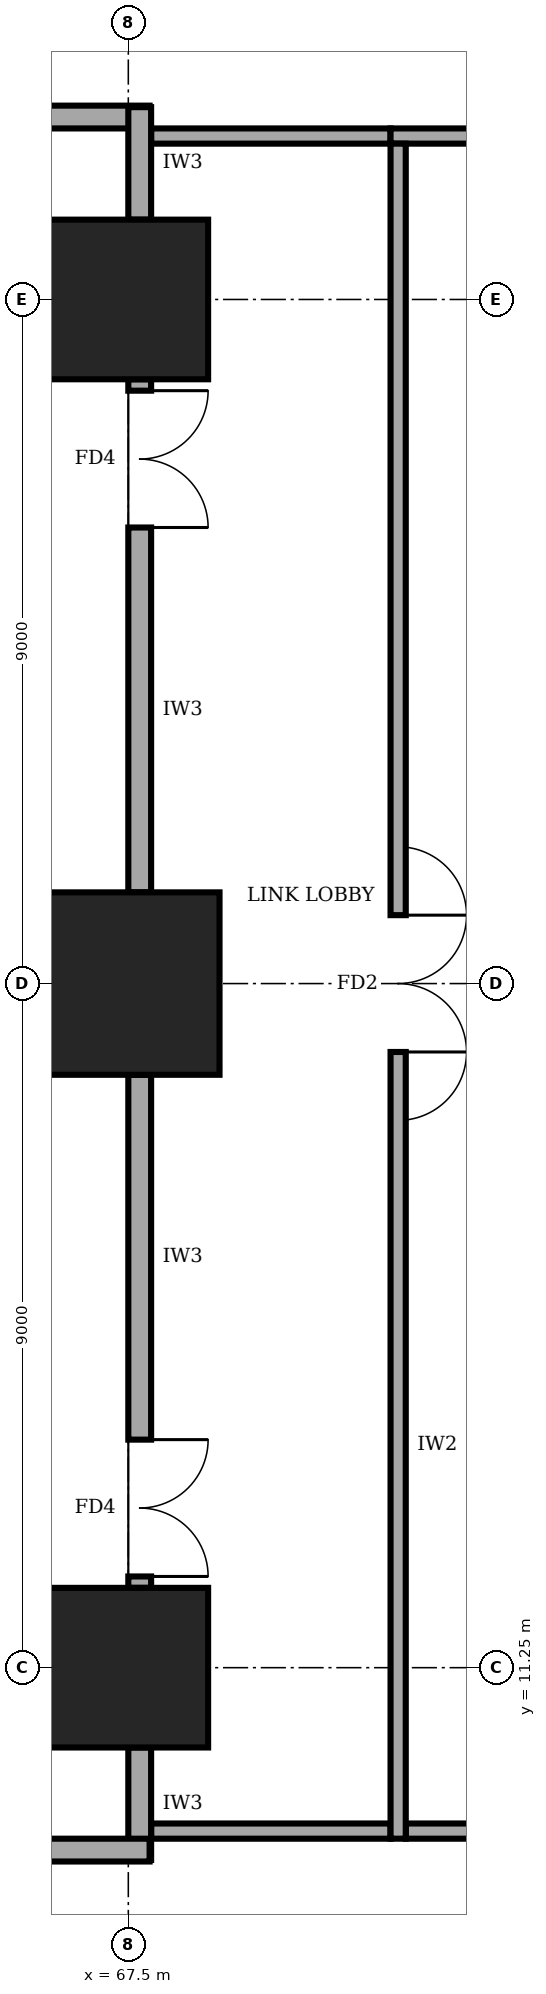
"""IFC4 building model, lengths in metres.
Left out: names, types, materials, properties, quantities, classifications, styles, units other than length and angle.
Written with IfcOpenShell. Run it as: python <this file> out.ifc"""

import sys

from ifc_helpers import new_model, si_unit, direction, frame, frame_2d, origin, origin_2d, place, context, subcontext, project, spatial, rectangle, extrude, element, fill, save


model = new_model("IFC4")
c1 = context("Model", 3, precision=1e-05, world=origin(), true_north=direction((0.0, 1.0)))
c2 = subcontext(c1, "Body", "Model", "MODEL_VIEW")
j1 = project(units=[si_unit("LENGTHUNIT", "METRE"), si_unit("PLANEANGLEUNIT", "RADIAN")], contexts=[c1])
p1 = place(None, origin())
s1 = spatial("IfcSite", under=j1, at=p1, CompositionType="ELEMENT")
p2 = place(p1, origin())
s2 = spatial("IfcBuilding", under=s1, at=p2, CompositionType="ELEMENT")
p3 = place(p2, frame((0.0, 0.0, 121.0)))
s3 = spatial("IfcBuildingStorey", under=s2, at=p3, CompositionType="ELEMENT", Elevation=121.0)
p4 = place(p3, frame((67.5, 11.25, 0.0), z_axis=(0.0, 0.0, 1.0), x_axis=(1.0, 0.0, 0.0)))
e1 = element("IfcColumn", 1, at=p4, inside=s3, PredefinedType="COLUMN", context=c2, shape_type="SweptSolid", body=[
    extrude(rectangle(XDim=2.1, YDim=2.1, at=origin_2d()), origin(), (0.0, 0.0, 1.0), 4.0),
])
p5 = place(p3, frame((67.5, 20.25, 0.0), z_axis=(0.0, 0.0, 1.0), x_axis=(1.0, 0.0, 0.0)))
e2 = element("IfcColumn", 2, at=p5, inside=s3, PredefinedType="COLUMN", context=c2, shape_type="SweptSolid", body=[
    extrude(rectangle(XDim=2.4, YDim=2.4, at=origin_2d()), origin(), (0.0, 0.0, 1.0), 4.0),
])
p6 = place(p3, frame((67.5, 29.25, 0.0), z_axis=(0.0, 0.0, 1.0), x_axis=(1.0, 0.0, 0.0)))
e3 = element("IfcColumn", 3, at=p6, inside=s3, PredefinedType="COLUMN", context=c2, shape_type="SweptSolid", body=[
    extrude(rectangle(XDim=2.1, YDim=2.1, at=origin_2d()), origin(), (0.0, 0.0, 1.0), 4.0),
])
p7 = place(p3, frame((63.02, 31.65, 0.0), z_axis=(0.0, 0.0, 1.0), x_axis=(1.0, 0.0, 0.0)))
e4 = element("IfcWall", 4, at=p7, inside=s3, PredefinedType="SOLIDWALL", context=c2, shape_type="SweptSolid", body=[
    extrude(rectangle(XDim=4.76, YDim=0.3, at=frame_2d((2.38, 0.0))), origin(), (0.0, 0.0, 1.0), 3.75),
])
p8 = place(p3, frame((67.65, 31.78, 0.0), z_axis=(0.0, 0.0, 1.0), x_axis=(0.0, -1.0, 0.0)))
e5 = element("IfcWall", 5, at=p8, inside=s3, PredefinedType="SOLIDWALL", context=c2, shape_type="SweptSolid", body=[
    extrude(rectangle(XDim=1.48, YDim=0.3, at=frame_2d((0.74, 0.0))), origin(), (0.0, 0.0, 1.0), 2.65),
])
p9 = place(p3, frame((67.65, 28.2, 0.0), z_axis=(0.0, 0.0, 1.0), x_axis=(0.0, -1.0, 0.0)))
e6 = element("IfcWall", 6, at=p9, inside=s3, PredefinedType="SOLIDWALL", context=c2, shape_type="SweptSolid", body=[
    extrude(rectangle(XDim=6.75, YDim=0.3, at=frame_2d((3.375, 0.0))), origin(), (0.0, 0.0, 1.0), 2.65),
])
p10 = place(p9, frame((0.15, 0.0, 0.0)))
e7 = element("IfcOpeningElement", 7, at=p10, cuts=e6, PredefinedType="OPENING", context=c2, shape_type="SweptSolid", body=[
    extrude(rectangle(XDim=1.8, YDim=2.1, at=frame_2d((0.9, 1.05))), frame((0.0, 0.16, 0.0), z_axis=(0.0, -1.0, 0.0), x_axis=(1.0, 0.0, 0.0)), (0.0, 0.0, 1.0), 0.32),
])
p11 = place(p3, frame((67.65, 19.05, 0.0), z_axis=(0.0, 0.0, 1.0), x_axis=(0.0, -1.0, 0.0)))
e8 = element("IfcWall", 8, at=p11, inside=s3, PredefinedType="SOLIDWALL", context=c2, shape_type="SweptSolid", body=[
    extrude(rectangle(XDim=6.75, YDim=0.3, at=frame_2d((3.375, 0.0))), origin(), (0.0, 0.0, 1.0), 2.65),
])
p12 = place(p11, frame((4.8, 0.0, 0.0)))
e9 = element("IfcOpeningElement", 9, at=p12, cuts=e8, PredefinedType="OPENING", context=c2, shape_type="SweptSolid", body=[
    extrude(rectangle(XDim=1.8, YDim=2.1, at=frame_2d((0.9, 1.05))), frame((0.0, 0.16, 0.0), z_axis=(0.0, -1.0, 0.0), x_axis=(1.0, 0.0, 0.0)), (0.0, 0.0, 1.0), 0.32),
])
p13 = place(p3, frame((67.65, 10.2, 0.0), z_axis=(0.0, 0.0, 1.0), x_axis=(0.0, -1.0, 0.0)))
e10 = element("IfcWall", 10, at=p13, inside=s3, PredefinedType="SOLIDWALL", context=c2, shape_type="SweptSolid", body=[
    extrude(rectangle(XDim=1.48, YDim=0.3, at=frame_2d((0.74, 0.0))), origin(), (0.0, 0.0, 1.0), 2.65),
])
p14 = place(p3, frame((67.78, 8.85, 0.0), z_axis=(0.0, 0.0, 1.0), x_axis=(-1.0, 0.0, 0.0)))
e11 = element("IfcWall", 11, at=p14, inside=s3, PredefinedType="SOLIDWALL", context=c2, shape_type="SweptSolid", body=[
    extrude(rectangle(XDim=4.76, YDim=0.3, at=frame_2d((2.38, 0.0))), origin(), (0.0, 0.0, 1.0), 3.75),
])
p15 = place(p3, frame((71.15, 9.1, 0.0), z_axis=(0.0, 0.0, 1.0), x_axis=(1.0, 0.0, 0.0)))
e12 = element("IfcWall", 12, at=p15, inside=s3, PredefinedType="SOLIDWALL", context=c2, shape_type="SweptSolid", body=[
    extrude(rectangle(XDim=18.4, YDim=0.2, at=frame_2d((9.2, 0.0))), origin(), (0.0, 0.0, 1.0), 3.75),
])
p16 = place(p15, frame((2.075, 0.0, 0.0)))
e13 = element("IfcOpeningElement", 13, at=p16, cuts=e12, PredefinedType="OPENING", context=c2, shape_type="SweptSolid", body=[
    extrude(rectangle(XDim=1.0, YDim=2.1, at=frame_2d((0.5, 1.05))), frame((0.0, 0.11, 0.0), z_axis=(0.0, -1.0, 0.0), x_axis=(1.0, 0.0, 0.0)), (0.0, 0.0, 1.0), 0.22),
])
p17 = place(p15, frame((9.35, 0.0, 0.0)))
e14 = element("IfcOpeningElement", 14, at=p17, cuts=e12, PredefinedType="OPENING", context=c2, shape_type="SweptSolid", body=[
    extrude(rectangle(XDim=1.0, YDim=2.1, at=frame_2d((0.5, 1.05))), frame((0.0, 0.11, 0.0), z_axis=(0.0, -1.0, 0.0), x_axis=(1.0, 0.0, 0.0)), (0.0, 0.0, 1.0), 0.22),
])
p18 = place(p15, frame((15.875, 0.0, 0.0)))
e15 = element("IfcOpeningElement", 15, at=p18, cuts=e12, PredefinedType="OPENING", context=c2, shape_type="SweptSolid", body=[
    extrude(rectangle(XDim=1.0, YDim=2.1, at=frame_2d((0.5, 1.05))), frame((0.0, 0.11, 0.0), z_axis=(0.0, -1.0, 0.0), x_axis=(1.0, 0.0, 0.0)), (0.0, 0.0, 1.0), 0.22),
])
p19 = place(p3, frame((89.35, 31.4, 0.0), z_axis=(0.0, 0.0, 1.0), x_axis=(-1.0, 0.0, 0.0)))
e16 = element("IfcWall", 16, at=p19, inside=s3, PredefinedType="SOLIDWALL", context=c2, shape_type="SweptSolid", body=[
    extrude(rectangle(XDim=18.4, YDim=0.2, at=frame_2d((9.2, 0.0))), origin(), (0.0, 0.0, 1.0), 3.75),
])
p20 = place(p19, frame((14.725, 0.0, 0.0)))
e17 = element("IfcOpeningElement", 17, at=p20, cuts=e16, PredefinedType="OPENING", context=c2, shape_type="SweptSolid", body=[
    extrude(rectangle(XDim=1.8, YDim=2.1, at=frame_2d((0.9, 1.05))), frame((0.0, 0.11, 0.0), z_axis=(0.0, -1.0, 0.0), x_axis=(1.0, 0.0, 0.0)), (0.0, 0.0, 1.0), 0.22),
])
p21 = place(p19, frame((7.85, 0.0, 0.0)))
e18 = element("IfcOpeningElement", 18, at=p21, cuts=e16, PredefinedType="OPENING", context=c2, shape_type="SweptSolid", body=[
    extrude(rectangle(XDim=1.0, YDim=2.1, at=frame_2d((0.5, 1.05))), frame((0.0, 0.11, 0.0), z_axis=(0.0, -1.0, 0.0), x_axis=(1.0, 0.0, 0.0)), (0.0, 0.0, 1.0), 0.22),
])
p22 = place(p19, frame((1.325, 0.0, 0.0)))
e19 = element("IfcOpeningElement", 19, at=p22, cuts=e16, PredefinedType="OPENING", context=c2, shape_type="SweptSolid", body=[
    extrude(rectangle(XDim=1.0, YDim=2.1, at=frame_2d((0.5, 1.05))), frame((0.0, 0.11, 0.0), z_axis=(0.0, -1.0, 0.0), x_axis=(1.0, 0.0, 0.0)), (0.0, 0.0, 1.0), 0.22),
])
p23 = place(p3, frame((71.05, 31.3, 0.0), z_axis=(0.0, 0.0, 1.0), x_axis=(0.0, -1.0, 0.0)))
e20 = element("IfcWall", 20, at=p23, inside=s3, PredefinedType="SOLIDWALL", context=c2, shape_type="SweptSolid", body=[
    extrude(rectangle(XDim=22.3, YDim=0.2, at=frame_2d((11.15, 0.0))), origin(), (0.0, 0.0, 1.0), 3.75),
])
p24 = place(p23, frame((10.15, 0.0, 0.0)))
e21 = element("IfcOpeningElement", 21, at=p24, cuts=e20, PredefinedType="OPENING", context=c2, shape_type="SweptSolid", body=[
    extrude(rectangle(XDim=1.8, YDim=2.1, at=frame_2d((0.9, 1.05))), frame((0.0, 0.11, 0.0), z_axis=(0.0, -1.0, 0.0), x_axis=(1.0, 0.0, 0.0)), (0.0, 0.0, 1.0), 0.22),
])
for number, where, z_axis, x_axis in (
    (22, (67.8, 9.1, 0.0), (0.0, 0.0, 1.0), (1.0, 0.0, 0.0)),
    (23, (67.8, 31.4, 0.0), (0.0, 0.0, 1.0), (1.0, 0.0, 0.0)),
):
    element("IfcWall", number, at=place(p3, frame(where, z_axis=z_axis, x_axis=x_axis)), inside=s3, PredefinedType="SOLIDWALL", context=c2, shape_type="SweptSolid", body=[
        extrude(rectangle(XDim=3.15, YDim=0.2, at=frame_2d((1.575, 0.0))), origin(), (0.0, 0.0, 1.0), 3.75),
    ])
p25 = place(p3, frame((63.5, 15.1, 0.0), z_axis=(0.0, 0.0, 1.0), x_axis=(1.0, 0.0, 0.0)))
e24 = element("IfcWall", 24, at=p25, inside=s3, PredefinedType="SOLIDWALL", context=c2, shape_type="SweptSolid", body=[
    extrude(rectangle(XDim=4.0, YDim=0.2, at=frame_2d((2.0, 0.0))), origin(), (0.0, 0.0, 1.0), 3.75),
])
p26 = place(p25, frame((1.4, 0.0, 0.0)))
e25 = element("IfcOpeningElement", 25, at=p26, cuts=e24, PredefinedType="OPENING", context=c2, shape_type="SweptSolid", body=[
    extrude(rectangle(XDim=1.0, YDim=2.1, at=frame_2d((0.5, 1.05))), frame((0.0, 0.11, 0.0), z_axis=(0.0, -1.0, 0.0), x_axis=(1.0, 0.0, 0.0)), (0.0, 0.0, 1.0), 0.22),
])
p27 = place(p3, frame((63.5, 25.4, 0.0), z_axis=(0.0, 0.0, 1.0), x_axis=(1.0, 0.0, 0.0)))
e26 = element("IfcWall", 26, at=p27, inside=s3, PredefinedType="SOLIDWALL", context=c2, shape_type="SweptSolid", body=[
    extrude(rectangle(XDim=4.0, YDim=0.2, at=frame_2d((2.0, 0.0))), origin(), (0.0, 0.0, 1.0), 3.75),
])
p28 = place(p27, frame((1.4, 0.0, 0.0)))
e27 = element("IfcOpeningElement", 27, at=p28, cuts=e26, PredefinedType="OPENING", context=c2, shape_type="SweptSolid", body=[
    extrude(rectangle(XDim=1.0, YDim=2.1, at=frame_2d((0.5, 1.05))), frame((0.0, 0.11, 0.0), z_axis=(0.0, -1.0, 0.0), x_axis=(1.0, 0.0, 0.0)), (0.0, 0.0, 1.0), 0.22),
])
p29 = place(p24, origin())
e28 = element("IfcDoor", 28, at=p29, inside=s3, OperationType="DOUBLE_DOOR_SINGLE_SWING", PredefinedType="DOOR", context=c2, shape_type="SweptSolid", body=[
    extrude(rectangle(XDim=1.8, YDim=2.1, at=frame_2d((0.9, 1.05))), frame((0.0, 0.025, 0.0), z_axis=(0.0, -1.0, 0.0), x_axis=(1.0, 0.0, 0.0)), (0.0, 0.0, 1.0), 0.05),
])
fill(e21, e28)
p30 = place(p10, origin())
e29 = element("IfcDoor", 29, at=p30, inside=s3, OperationType="DOUBLE_DOOR_SINGLE_SWING", PredefinedType="DOOR", context=c2, shape_type="SweptSolid", body=[
    extrude(rectangle(XDim=1.8, YDim=2.1, at=frame_2d((0.9, 1.05))), frame((0.0, 0.025, 0.0), z_axis=(0.0, -1.0, 0.0), x_axis=(1.0, 0.0, 0.0)), (0.0, 0.0, 1.0), 0.05),
])
fill(e7, e29)
p31 = place(p12, origin())
e30 = element("IfcDoor", 30, at=p31, inside=s3, OperationType="DOUBLE_DOOR_SINGLE_SWING", PredefinedType="DOOR", context=c2, shape_type="SweptSolid", body=[
    extrude(rectangle(XDim=1.8, YDim=2.1, at=frame_2d((0.9, 1.05))), frame((0.0, 0.025, 0.0), z_axis=(0.0, -1.0, 0.0), x_axis=(1.0, 0.0, 0.0)), (0.0, 0.0, 1.0), 0.05),
])
fill(e9, e30)
save(model, sys.argv[1])
